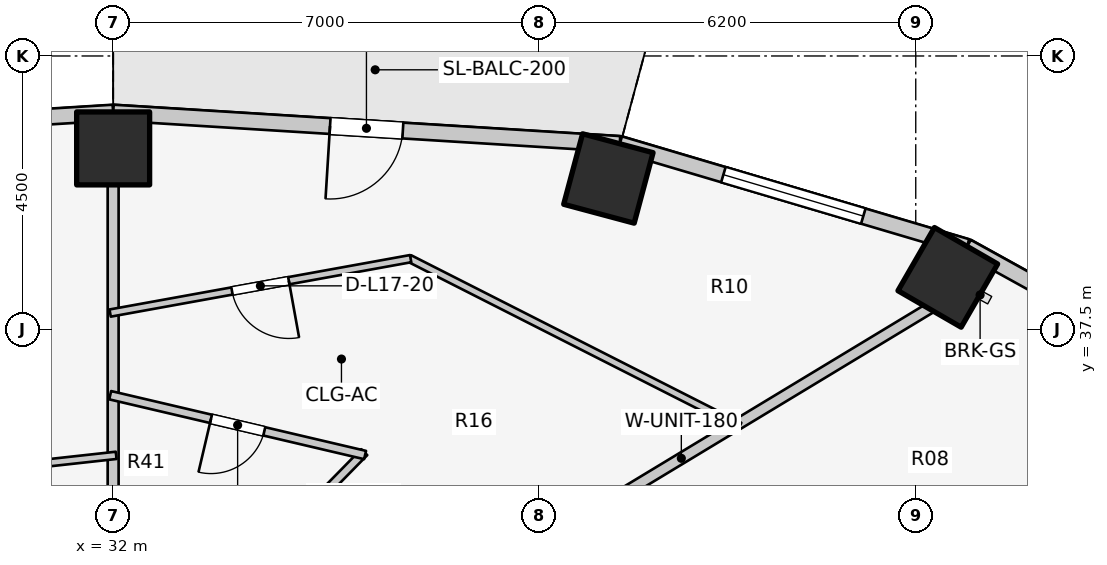
"""IFC4 building model, lengths in metres.
Left out: names, types, materials, properties, quantities, classifications, styles, units other than length and angle.
Written with IfcOpenShell. Run it as: python <this file> out.ifc"""

import sys

from ifc_helpers import new_model, si_unit, direction, frame, frame_2d, origin, origin_2d, place, context, subcontext, project, spatial, rectangle, extrude, element, fill, save


model = new_model("IFC4")
c1 = context("Model", 3, precision=1e-05, world=origin(), true_north=direction((0.0, 1.0)))
c2 = subcontext(c1, "Body", "Model", "MODEL_VIEW")
j1 = project(units=[si_unit("LENGTHUNIT", "METRE"), si_unit("PLANEANGLEUNIT", "RADIAN")], contexts=[c1])
p1 = place(None, origin())
s1 = spatial("IfcSite", under=j1, at=p1, CompositionType="ELEMENT")
p2 = place(p1, origin())
s2 = spatial("IfcBuilding", under=s1, at=p2, CompositionType="ELEMENT")
p3 = place(p2, frame((0.0, 0.0, 58.6)))
s3 = spatial("IfcBuildingStorey", under=s2, at=p3, CompositionType="ELEMENT", Elevation=58.6)
for number, where, z_axis, x_axis in (
    (1, (45.727, 38.359, 0.0), (0.0, 0.0, 1.0), (0.5, 0.866, 0.0)),
    (2, (40.145, 39.986, 0.0), (0.0, 0.0, 1.0), (0.259, 0.966, 0.0)),
    (3, (32.0, 40.48, 0.0), (0.0, 0.0, 1.0), (0.0, 1.0, 0.0)),
):
    element("IfcColumn", number, at=place(p3, frame(where, z_axis=z_axis, x_axis=x_axis)), inside=s3, PredefinedType="COLUMN", context=c2, shape_type="SweptSolid", body=[
        extrude(rectangle(XDim=1.2, YDim=1.2, at=origin_2d()), origin(), (0.0, 0.0, 1.0), 3.1),
    ])
p4 = place(p3, frame((50.405, 36.45, 0.0), z_axis=(0.0, 0.0, 1.0), x_axis=(-0.875137303239, 0.483874674352, 0.0)))
e4 = element("IfcWall", 4, at=p4, inside=s3, PredefinedType="STANDARD", context=c2, shape_type="SweptSolid", body=[
    extrude(rectangle(XDim=4.985, YDim=0.26, at=frame_2d((2.493, 0.0))), origin(), (0.0, 0.0, 1.0), 2.85),
])
p5 = place(p3, frame((46.042, 38.862, 0.0), z_axis=(0.0, 0.0, 1.0), x_axis=(-0.958843593522, 0.283934786811, 0.0)))
e5 = element("IfcWall", 5, at=p5, inside=s3, PredefinedType="STANDARD", context=c2, shape_type="SweptSolid", body=[
    extrude(rectangle(XDim=5.955, YDim=0.26, at=frame_2d((2.978, 0.0))), origin(), (0.0, 0.0, 1.0), 2.85),
])
p6 = place(p5, frame((1.778, 0.0, 0.75)))
e6 = element("IfcOpeningElement", 6, at=p6, cuts=e5, PredefinedType="OPENING", context=c2, shape_type="SweptSolid", body=[
    extrude(rectangle(XDim=2.4, YDim=1.7, at=frame_2d((1.2, 0.85))), frame((0.0, 0.14, 0.0), z_axis=(0.0, -1.0, 0.0), x_axis=(1.0, 0.0, 0.0)), (0.0, 0.0, 1.0), 0.28),
])
p7 = place(p3, frame((40.332, 40.553, 0.0), z_axis=(0.0, 0.0, 1.0), x_axis=(-0.998090514779, 0.061768311519, 0.0)))
e7 = element("IfcWall", 7, at=p7, inside=s3, PredefinedType="STANDARD", context=c2, shape_type="SweptSolid", body=[
    extrude(rectangle(XDim=8.348, YDim=0.26, at=frame_2d((4.174, 0.0))), origin(), (0.0, 0.0, 1.0), 2.88),
])
p8 = place(p7, frame((3.574, 0.0, 0.0)))
e8 = element("IfcOpeningElement", 8, at=p8, cuts=e7, PredefinedType="OPENING", context=c2, shape_type="SweptSolid", body=[
    extrude(rectangle(XDim=1.2, YDim=2.2, at=frame_2d((0.6, 1.1))), frame((0.0, 0.14, 0.0), z_axis=(0.0, -1.0, 0.0), x_axis=(1.0, 0.0, 0.0)), (0.0, 0.0, 1.0), 0.28),
])
p9 = place(p3, frame((32.0, 41.069, 0.0), z_axis=(0.0, 0.0, 1.0), x_axis=(-0.998090514779, -0.061768311519, 0.0)))
e9 = element("IfcWall", 9, at=p9, inside=s3, PredefinedType="STANDARD", context=c2, shape_type="SweptSolid", body=[
    extrude(rectangle(XDim=8.348, YDim=0.26, at=frame_2d((4.174, 0.0))), origin(), (0.0, 0.0, 1.0), 2.85),
])
p10 = place(p9, frame((3.424, 0.0, 0.75)))
e10 = element("IfcOpeningElement", 10, at=p10, cuts=e9, PredefinedType="OPENING", context=c2, shape_type="SweptSolid", body=[
    extrude(rectangle(XDim=1.5, YDim=1.6, at=frame_2d((0.75, 0.8))), frame((0.0, 0.14, 0.0), z_axis=(0.0, -1.0, 0.0), x_axis=(1.0, 0.0, 0.0)), (0.0, 0.0, 1.0), 0.28),
])
p11 = place(p3, frame((37.252, 32.91, 0.0), z_axis=(0.0, 0.0, 1.0), x_axis=(0.855817136021, 0.517278483694, 0.0)))
e11 = element("IfcWall", 11, at=p11, inside=s3, PredefinedType="PARTITIONING", context=c2, shape_type="SweptSolid", body=[
    extrude(rectangle(XDim=9.564, YDim=0.18, at=frame_2d((4.782, 0.0))), origin(), (0.0, 0.0, 1.0), 2.237),
])
p12 = place(p3, frame((32.0, 34.465, 0.0), z_axis=(0.0, 0.0, 1.0), x_axis=(0.0, 1.0, 0.0)))
e12 = element("IfcWall", 12, at=p12, inside=s3, PredefinedType="PARTITIONING", context=c2, shape_type="SweptSolid", body=[
    extrude(rectangle(XDim=5.435, YDim=0.18, at=frame_2d((2.717, 0.0))), origin(), (0.0, 0.0, 1.0), 2.237),
])
p13 = place(p3, frame((42.305, 35.914, 0.0), z_axis=(0.0, 0.0, 1.0), x_axis=(-0.891749407737, 0.452529550195, 0.0)))
e13 = element("IfcWall", 13, at=p13, inside=s3, PredefinedType="MOVABLE", context=c2, shape_type="SweptSolid", body=[
    extrude(rectangle(XDim=6.09, YDim=0.12, at=frame_2d((3.045, 0.0))), origin(), (0.0, 0.0, 1.0), 2.237),
])
p14 = place(p3, frame((36.893, 38.667, 0.0), z_axis=(0.0, 0.0, 1.0), x_axis=(-0.983992567634, -0.178209502665, 0.0)))
e14 = element("IfcWall", 14, at=p14, inside=s3, PredefinedType="MOVABLE", context=c2, shape_type="SweptSolid", body=[
    extrude(rectangle(XDim=5.022, YDim=0.12, at=frame_2d((2.511, 0.0))), origin(), (0.0, 0.0, 1.0), 2.237),
])
p15 = place(p14, frame((2.036, 0.0, 0.0)))
e15 = element("IfcOpeningElement", 15, at=p15, cuts=e14, PredefinedType="OPENING", context=c2, shape_type="SweptSolid", body=[
    extrude(rectangle(XDim=0.95, YDim=2.1, at=frame_2d((0.475, 1.05))), frame((0.0, 0.07, 0.0), z_axis=(0.0, -1.0, 0.0), x_axis=(1.0, 0.0, 0.0)), (0.0, 0.0, 1.0), 0.14),
])
p16 = place(p3, frame((34.659, 33.986, 0.0), z_axis=(0.0, 0.0, 1.0), x_axis=(0.700331728855, 0.713817532398, 0.0)))
e16 = element("IfcWall", 16, at=p16, inside=s3, PredefinedType="PLUMBINGWALL", context=c2, shape_type="SweptSolid", body=[
    extrude(rectangle(XDim=2.1, YDim=0.14, at=frame_2d((1.05, 0.0))), origin(), (0.0, 0.0, 1.0), 2.385),
])
p17 = place(p3, frame((36.144, 35.438, 0.0), z_axis=(0.0, 0.0, 1.0), x_axis=(-0.973546394015, 0.228489427982, 0.0)))
e17 = element("IfcWall", 17, at=p17, inside=s3, PredefinedType="PLUMBINGWALL", context=c2, shape_type="SweptSolid", body=[
    extrude(rectangle(XDim=4.306, YDim=0.14, at=frame_2d((2.153, 0.0))), origin(), (0.0, 0.0, 1.0), 2.237),
])
p18 = place(p17, frame((1.703, 0.0, 0.0)))
e18 = element("IfcOpeningElement", 18, at=p18, cuts=e17, PredefinedType="OPENING", context=c2, shape_type="SweptSolid", body=[
    extrude(rectangle(XDim=0.9, YDim=2.1, at=frame_2d((0.45, 1.05))), frame((0.0, 0.08, 0.0), z_axis=(0.0, -1.0, 0.0), x_axis=(1.0, 0.0, 0.0)), (0.0, 0.0, 1.0), 0.16),
])
p19 = place(p3, frame((32.05, 35.432, 0.0), z_axis=(0.0, 0.0, 1.0), x_axis=(-0.993997647441, -0.109401448263, 0.0)))
e19 = element("IfcWall", 19, at=p19, inside=s3, PredefinedType="MOVABLE", context=c2, shape_type="SweptSolid", body=[
    extrude(rectangle(XDim=3.798, YDim=0.12, at=frame_2d((1.899, 0.0))), origin(), (0.0, 0.0, 1.0), 2.237),
])
p20 = place(p19, frame((1.424, 0.0, 0.0)))
e20 = element("IfcOpeningElement", 20, at=p20, cuts=e19, PredefinedType="OPENING", context=c2, shape_type="SweptSolid", body=[
    extrude(rectangle(XDim=0.95, YDim=2.1, at=frame_2d((0.475, 1.05))), frame((0.0, 0.07, 0.0), z_axis=(0.0, -1.0, 0.0), x_axis=(1.0, 0.0, 0.0)), (0.0, 0.0, 1.0), 0.14),
])
p21 = place(p6, origin())
e21 = element("IfcWindow", 21, at=p21, inside=s3, PartitioningType="SINGLE_PANEL", PredefinedType="WINDOW", context=c2, shape_type="SweptSolid", body=[
    extrude(rectangle(XDim=2.4, YDim=1.7, at=frame_2d((1.2, 0.85))), frame((0.0, 0.03, 0.0), z_axis=(0.0, -1.0, 0.0), x_axis=(1.0, 0.0, 0.0)), (0.0, 0.0, 1.0), 0.06),
])
fill(e6, e21)
p22 = place(p8, origin())
e22 = element("IfcDoor", 22, at=p22, inside=s3, OperationType="SINGLE_SWING_RIGHT", PredefinedType="DOOR", context=c2, shape_type="SweptSolid", body=[
    extrude(rectangle(XDim=1.2, YDim=2.2, at=frame_2d((0.6, 1.1))), frame((0.0, 0.025, 0.0), z_axis=(0.0, -1.0, 0.0), x_axis=(1.0, 0.0, 0.0)), (0.0, 0.0, 1.0), 0.05),
])
fill(e8, e22)
p23 = place(p15, origin())
e23 = element("IfcDoor", 23, at=p23, inside=s3, OperationType="SINGLE_SWING_LEFT", PredefinedType="DOOR", context=c2, shape_type="SweptSolid", body=[
    extrude(rectangle(XDim=0.95, YDim=2.1, at=frame_2d((0.475, 1.05))), frame((0.0, 0.025, 0.0), z_axis=(0.0, -1.0, 0.0), x_axis=(1.0, 0.0, 0.0)), (0.0, 0.0, 1.0), 0.05),
])
fill(e15, e23)
p24 = place(p18, origin())
e24 = element("IfcDoor", 24, at=p24, inside=s3, OperationType="SINGLE_SWING_RIGHT", PredefinedType="DOOR", context=c2, shape_type="SweptSolid", body=[
    extrude(rectangle(XDim=0.9, YDim=2.1, at=frame_2d((0.45, 1.05))), frame((0.0, 0.025, 0.0), z_axis=(0.0, -1.0, 0.0), x_axis=(1.0, 0.0, 0.0)), (0.0, 0.0, 1.0), 0.05),
])
fill(e18, e24)
save(model, sys.argv[1])
